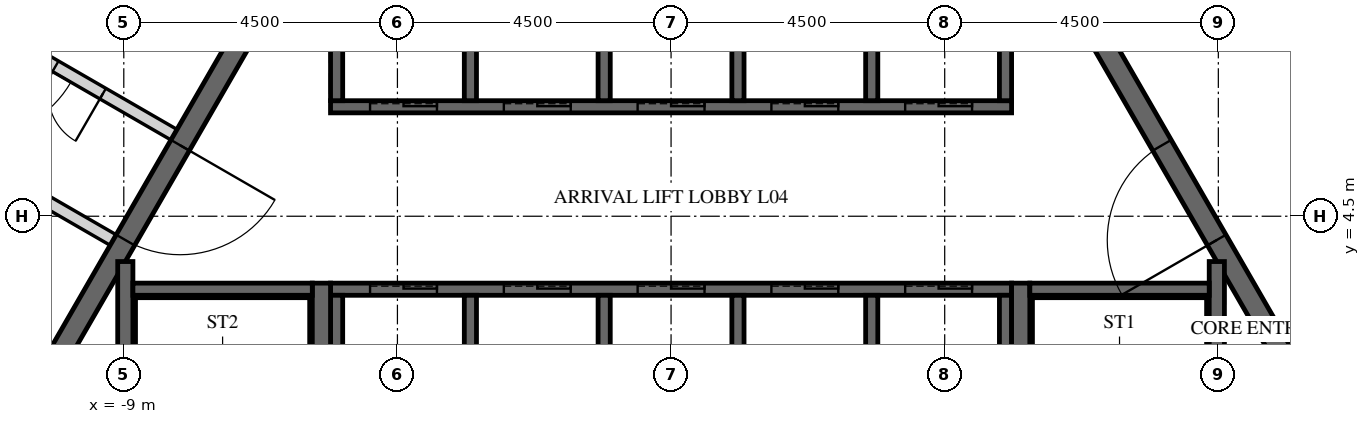
"""IFC4 building model, lengths in metres.
Left out: names, types, materials, properties, quantities, classifications, styles, units other than length and angle.
Written with IfcOpenShell. Run it as: python <this file> out.ifc"""

import sys

from ifc_helpers import new_model, si_unit, direction, frame, frame_2d, origin, place, context, subcontext, project, spatial, polyline, rectangle, outline, extrude, element, fill, save


model = new_model("IFC4")
c1 = context("Model", 3, precision=1e-05, world=origin(), true_north=direction((0.0, 1.0)))
c2 = subcontext(c1, "Body", "Model", "MODEL_VIEW")
j1 = project(units=[si_unit("LENGTHUNIT", "METRE"), si_unit("PLANEANGLEUNIT", "RADIAN")], contexts=[c1])
p1 = place(None, origin())
s1 = spatial("IfcSite", under=j1, at=p1, CompositionType="ELEMENT")
p2 = place(p1, origin())
s2 = spatial("IfcBuilding", under=s1, at=p2, CompositionType="ELEMENT")
p3 = place(p2, frame((0.0, 0.0, 26.0)))
s3 = spatial("IfcBuildingStorey", under=s2, at=p3, CompositionType="ELEMENT", Elevation=26.0)
p4 = place(p3, frame((-7.91, 13.7, -0.25), z_axis=(0.0, 0.0, 1.0), x_axis=(-0.499999880136, -0.866025472988, 0.0)))
e1 = element("IfcWall", 1, at=p4, inside=s3, PredefinedType="SHEAR", context=c2, shape_type="SweptSolid", body=[
    extrude(outline(polyline([(-0.173, -0.3), (15.993, -0.3), (15.646, 0.3), (0.173, 0.3), (-0.173, -0.3)])), origin(), (0.0, 0.0, 1.0), 5.45),
])
p5 = place(p4, frame((7.039, 0.0, 0.25)))
e2 = element("IfcOpeningElement", 2, at=p5, cuts=e1, PredefinedType="OPENING", context=c2, shape_type="SweptSolid", body=[
    extrude(rectangle(XDim=1.8, YDim=2.4, at=frame_2d((0.9, 1.2))), frame((0.0, 0.31, 0.0), z_axis=(0.0, -1.0, 0.0), x_axis=(1.0, 0.0, 0.0)), (0.0, 0.0, 1.0), 0.62),
])
p6 = place(p3, frame((15.819, 0.0, -0.25), z_axis=(0.0, 0.0, 1.0), x_axis=(-0.499999880136, 0.866025472988, 0.0)))
e3 = element("IfcWall", 3, at=p6, inside=s3, PredefinedType="SHEAR", context=c2, shape_type="SweptSolid", body=[
    extrude(outline(polyline([(-0.173, -0.3), (15.993, -0.3), (15.646, 0.3), (0.173, 0.3), (-0.173, -0.3)])), origin(), (0.0, 0.0, 1.0), 5.45),
])
p7 = place(p6, frame((6.981, 0.0, 0.25)))
e4 = element("IfcOpeningElement", 4, at=p7, cuts=e3, PredefinedType="OPENING", context=c2, shape_type="SweptSolid", body=[
    extrude(rectangle(XDim=1.8, YDim=2.4, at=frame_2d((0.9, 1.2))), frame((0.0, 0.31, 0.0), z_axis=(0.0, -1.0, 0.0), x_axis=(1.0, 0.0, 0.0)), (0.0, 0.0, 1.0), 0.62),
])
p8 = place(p3, frame((-5.673, 9.825, -0.25), z_axis=(0.0, 0.0, 1.0), x_axis=(-0.499995046907, -0.866028263435, 0.0)))
e5 = element("IfcWall", 5, at=p8, inside=s3, PredefinedType="SHEAR", context=c2, shape_type="SweptSolid", body=[
    extrude(outline(polyline([(-0.101, -0.175), (11.446, -0.175), (11.244, 0.175), (0.101, 0.175), (-0.101, -0.175)])), origin(), (0.0, 0.0, 1.0), 5.45),
])
p9 = place(p8, frame((4.801, 0.0, 0.25)))
e6 = element("IfcOpeningElement", 6, at=p9, cuts=e5, PredefinedType="OPENING", context=c2, shape_type="SweptSolid", body=[
    extrude(rectangle(XDim=1.8, YDim=2.4, at=frame_2d((0.9, 1.2))), frame((0.0, 0.185, 0.0), z_axis=(0.0, -1.0, 0.0), x_axis=(1.0, 0.0, 0.0)), (0.0, 0.0, 1.0), 0.37),
])
p10 = place(p3, frame((11.345, 0.0, -0.25), z_axis=(0.0, 0.0, 1.0), x_axis=(-0.499995046907, 0.866028263435, 0.0)))
e7 = element("IfcWall", 7, at=p10, inside=s3, PredefinedType="SHEAR", context=c2, shape_type="SweptSolid", body=[
    extrude(outline(polyline([(-0.101, -0.175), (11.446, -0.175), (11.244, 0.175), (0.101, 0.175), (-0.101, -0.175)])), origin(), (0.0, 0.0, 1.0), 5.45),
])
p11 = place(p10, frame((4.744, 0.0, 0.25)))
e8 = element("IfcOpeningElement", 8, at=p11, cuts=e7, PredefinedType="OPENING", context=c2, shape_type="SweptSolid", body=[
    extrude(rectangle(XDim=1.8, YDim=2.4, at=frame_2d((0.9, 1.2))), frame((0.0, 0.185, 0.0), z_axis=(0.0, -1.0, 0.0), x_axis=(1.0, 0.0, 0.0)), (0.0, 0.0, 1.0), 0.37),
])
p12 = place(p3, frame((-5.6, 6.3, -0.25), z_axis=(0.0, 0.0, 1.0), x_axis=(1.0, 0.0, 0.0)))
e9 = element("IfcWall", 9, at=p12, inside=s3, PredefinedType="SHEAR", context=c2, shape_type="SweptSolid", body=[
    extrude(rectangle(XDim=11.2, YDim=0.2, at=frame_2d((5.6, 0.0))), origin(), (0.0, 0.0, 1.0), 5.5),
])
p13 = place(p12, frame((0.65, 0.0, 0.25)))
e10 = element("IfcOpeningElement", 10, at=p13, cuts=e9, PredefinedType="OPENING", context=c2, shape_type="SweptSolid", body=[
    extrude(rectangle(XDim=1.1, YDim=2.1, at=frame_2d((0.55, 1.05))), frame((0.0, 0.11, 0.0), z_axis=(0.0, -1.0, 0.0), x_axis=(1.0, 0.0, 0.0)), (0.0, 0.0, 1.0), 0.22),
])
p14 = place(p12, frame((2.85, 0.0, 0.25)))
e11 = element("IfcOpeningElement", 11, at=p14, cuts=e9, PredefinedType="OPENING", context=c2, shape_type="SweptSolid", body=[
    extrude(rectangle(XDim=1.1, YDim=2.1, at=frame_2d((0.55, 1.05))), frame((0.0, 0.11, 0.0), z_axis=(0.0, -1.0, 0.0), x_axis=(1.0, 0.0, 0.0)), (0.0, 0.0, 1.0), 0.22),
])
p15 = place(p12, frame((5.05, 0.0, 0.25)))
e12 = element("IfcOpeningElement", 12, at=p15, cuts=e9, PredefinedType="OPENING", context=c2, shape_type="SweptSolid", body=[
    extrude(rectangle(XDim=1.1, YDim=2.1, at=frame_2d((0.55, 1.05))), frame((0.0, 0.11, 0.0), z_axis=(0.0, -1.0, 0.0), x_axis=(1.0, 0.0, 0.0)), (0.0, 0.0, 1.0), 0.22),
])
p16 = place(p12, frame((7.25, 0.0, 0.25)))
e13 = element("IfcOpeningElement", 13, at=p16, cuts=e9, PredefinedType="OPENING", context=c2, shape_type="SweptSolid", body=[
    extrude(rectangle(XDim=1.1, YDim=2.1, at=frame_2d((0.55, 1.05))), frame((0.0, 0.11, 0.0), z_axis=(0.0, -1.0, 0.0), x_axis=(1.0, 0.0, 0.0)), (0.0, 0.0, 1.0), 0.22),
])
p17 = place(p12, frame((9.45, 0.0, 0.25)))
e14 = element("IfcOpeningElement", 14, at=p17, cuts=e9, PredefinedType="OPENING", context=c2, shape_type="SweptSolid", body=[
    extrude(rectangle(XDim=1.1, YDim=2.1, at=frame_2d((0.55, 1.05))), frame((0.0, 0.11, 0.0), z_axis=(0.0, -1.0, 0.0), x_axis=(1.0, 0.0, 0.0)), (0.0, 0.0, 1.0), 0.22),
])
for number, where, z_axis, x_axis in (
    (15, (-5.5, 6.4, -0.25), (0.0, 0.0, 1.0), (0.0, 1.0, 0.0)),
    (16, (-3.3, 6.4, -0.25), (0.0, 0.0, 1.0), (0.0, 1.0, 0.0)),
    (17, (-1.1, 6.4, -0.25), (0.0, 0.0, 1.0), (0.0, 1.0, 0.0)),
    (18, (1.1, 6.4, -0.25), (0.0, 0.0, 1.0), (0.0, 1.0, 0.0)),
    (19, (3.3, 6.4, -0.25), (0.0, 0.0, 1.0), (0.0, 1.0, 0.0)),
    (20, (5.5, 6.4, -0.25), (0.0, 0.0, 1.0), (0.0, 1.0, 0.0)),
):
    element("IfcWall", number, at=place(p3, frame(where, z_axis=z_axis, x_axis=x_axis)), inside=s3, PredefinedType="SHEAR", context=c2, shape_type="SweptSolid", body=[
        extrude(rectangle(XDim=2.9, YDim=0.2, at=frame_2d((1.45, 0.0))), origin(), (0.0, 0.0, 1.0), 5.5),
    ])
p18 = place(p3, frame((-5.6, 3.3, -0.25), z_axis=(0.0, 0.0, 1.0), x_axis=(1.0, 0.0, 0.0)))
e21 = element("IfcWall", 21, at=p18, inside=s3, PredefinedType="SHEAR", context=c2, shape_type="SweptSolid", body=[
    extrude(rectangle(XDim=11.2, YDim=0.2, at=frame_2d((5.6, 0.0))), origin(), (0.0, 0.0, 1.0), 5.5),
])
p19 = place(p18, frame((0.65, 0.0, 0.25)))
e22 = element("IfcOpeningElement", 22, at=p19, cuts=e21, PredefinedType="OPENING", context=c2, shape_type="SweptSolid", body=[
    extrude(rectangle(XDim=1.1, YDim=2.1, at=frame_2d((0.55, 1.05))), frame((0.0, 0.11, 0.0), z_axis=(0.0, -1.0, 0.0), x_axis=(1.0, 0.0, 0.0)), (0.0, 0.0, 1.0), 0.22),
])
p20 = place(p18, frame((2.85, 0.0, 0.25)))
e23 = element("IfcOpeningElement", 23, at=p20, cuts=e21, PredefinedType="OPENING", context=c2, shape_type="SweptSolid", body=[
    extrude(rectangle(XDim=1.1, YDim=2.1, at=frame_2d((0.55, 1.05))), frame((0.0, 0.11, 0.0), z_axis=(0.0, -1.0, 0.0), x_axis=(1.0, 0.0, 0.0)), (0.0, 0.0, 1.0), 0.22),
])
p21 = place(p18, frame((5.05, 0.0, 0.25)))
e24 = element("IfcOpeningElement", 24, at=p21, cuts=e21, PredefinedType="OPENING", context=c2, shape_type="SweptSolid", body=[
    extrude(rectangle(XDim=1.1, YDim=2.1, at=frame_2d((0.55, 1.05))), frame((0.0, 0.11, 0.0), z_axis=(0.0, -1.0, 0.0), x_axis=(1.0, 0.0, 0.0)), (0.0, 0.0, 1.0), 0.22),
])
p22 = place(p18, frame((7.25, 0.0, 0.25)))
e25 = element("IfcOpeningElement", 25, at=p22, cuts=e21, PredefinedType="OPENING", context=c2, shape_type="SweptSolid", body=[
    extrude(rectangle(XDim=1.1, YDim=2.1, at=frame_2d((0.55, 1.05))), frame((0.0, 0.11, 0.0), z_axis=(0.0, -1.0, 0.0), x_axis=(1.0, 0.0, 0.0)), (0.0, 0.0, 1.0), 0.22),
])
p23 = place(p18, frame((9.45, 0.0, 0.25)))
e26 = element("IfcOpeningElement", 26, at=p23, cuts=e21, PredefinedType="OPENING", context=c2, shape_type="SweptSolid", body=[
    extrude(rectangle(XDim=1.1, YDim=2.1, at=frame_2d((0.55, 1.05))), frame((0.0, 0.11, 0.0), z_axis=(0.0, -1.0, 0.0), x_axis=(1.0, 0.0, 0.0)), (0.0, 0.0, 1.0), 0.22),
])
for number, where, z_axis, x_axis in (
    (27, (-5.5, 0.1, -0.25), (0.0, 0.0, 1.0), (0.0, 1.0, 0.0)),
    (28, (-3.3, 0.1, -0.25), (0.0, 0.0, 1.0), (0.0, 1.0, 0.0)),
    (29, (-1.1, 0.1, -0.25), (0.0, 0.0, 1.0), (0.0, 1.0, 0.0)),
    (30, (1.1, 0.1, -0.25), (0.0, 0.0, 1.0), (0.0, 1.0, 0.0)),
    (31, (3.3, 0.1, -0.25), (0.0, 0.0, 1.0), (0.0, 1.0, 0.0)),
    (32, (5.5, 0.1, -0.25), (0.0, 0.0, 1.0), (0.0, 1.0, 0.0)),
):
    element("IfcWall", number, at=place(p3, frame(where, z_axis=z_axis, x_axis=x_axis)), inside=s3, PredefinedType="SHEAR", context=c2, shape_type="SweptSolid", body=[
        extrude(rectangle(XDim=3.1, YDim=0.2, at=frame_2d((1.55, 0.0))), origin(), (0.0, 0.0, 1.0), 5.5),
    ])
p24 = place(p3, frame((-9.175, 4.109, 0.0), z_axis=(0.0, 0.0, 1.0), x_axis=(-0.865989465428, 0.500062241894, 0.0)))
e33 = element("IfcWall", 33, at=p24, inside=s3, PredefinedType="PARTITIONING", context=c2, shape_type="SweptSolid", body=[
    extrude(rectangle(XDim=3.4, YDim=0.2, at=frame_2d((1.7, 0.0))), origin(), (0.0, 0.0, 1.0), 5.25),
])
p25 = place(p24, frame((1.351, 0.0, 0.0)))
e34 = element("IfcOpeningElement", 34, at=p25, cuts=e33, PredefinedType="OPENING", context=c2, shape_type="SweptSolid", body=[
    extrude(rectangle(XDim=0.9, YDim=2.1, at=frame_2d((0.45, 1.05))), frame((0.0, 0.11, 0.0), z_axis=(0.0, -1.0, 0.0), x_axis=(1.0, 0.0, 0.0)), (0.0, 0.0, 1.0), 0.22),
])
p26 = place(p3, frame((-8.175, 5.841, 0.0), z_axis=(0.0, 0.0, 1.0), x_axis=(-0.866020560687, 0.500008388397, 0.0)))
e35 = element("IfcWall", 35, at=p26, inside=s3, PredefinedType="PARTITIONING", context=c2, shape_type="SweptSolid", body=[
    extrude(rectangle(XDim=3.4, YDim=0.2, at=frame_2d((1.7, 0.0))), origin(), (0.0, 0.0, 1.0), 5.25),
])
p27 = place(p26, frame((1.35, 0.0, 0.0)))
e36 = element("IfcOpeningElement", 36, at=p27, cuts=e35, PredefinedType="OPENING", context=c2, shape_type="SweptSolid", body=[
    extrude(rectangle(XDim=0.9, YDim=2.1, at=frame_2d((0.45, 1.05))), frame((0.0, 0.11, 0.0), z_axis=(0.0, -1.0, 0.0), x_axis=(1.0, 0.0, 0.0)), (0.0, 0.0, 1.0), 0.22),
])
p28 = place(p3, frame((5.75, -3.4, -0.25), z_axis=(0.0, 0.0, 1.0), x_axis=(0.0, 1.0, 0.0)))
e37 = element("IfcWall", 37, at=p28, inside=s3, PredefinedType="SHEAR", context=c2, shape_type="SweptSolid", body=[
    extrude(rectangle(XDim=6.8, YDim=0.3, at=frame_2d((3.4, 0.0))), origin(), (0.0, 0.0, 1.0), 5.5),
])
p29 = place(p3, frame((8.975, -3.755, -0.25), z_axis=(0.0, 0.0, 1.0), x_axis=(0.0, 1.0, 0.0)))
e38 = element("IfcWall", 38, at=p29, inside=s3, PredefinedType="SHEAR", context=c2, shape_type="SweptSolid", body=[
    extrude(rectangle(XDim=7.51, YDim=0.25, at=frame_2d((3.755, 0.0))), origin(), (0.0, 0.0, 1.0), 5.5),
])
p30 = place(p3, frame((5.9, 3.3, -0.25), z_axis=(0.0, 0.0, 1.0), x_axis=(1.0, 0.0, 0.0)))
e39 = element("IfcWall", 39, at=p30, inside=s3, PredefinedType="SHEAR", context=c2, shape_type="SweptSolid", body=[
    extrude(rectangle(XDim=2.95, YDim=0.2, at=frame_2d((1.475, 0.0))), origin(), (0.0, 0.0, 1.0), 5.5),
])
p31 = place(p3, frame((-5.75, -3.4, -0.25), z_axis=(0.0, 0.0, 1.0), x_axis=(0.0, 1.0, 0.0)))
e40 = element("IfcWall", 40, at=p31, inside=s3, PredefinedType="SHEAR", context=c2, shape_type="SweptSolid", body=[
    extrude(rectangle(XDim=6.8, YDim=0.3, at=frame_2d((3.4, 0.0))), origin(), (0.0, 0.0, 1.0), 5.5),
])
p32 = place(p3, frame((-8.975, -3.755, -0.25), z_axis=(0.0, 0.0, 1.0), x_axis=(0.0, 1.0, 0.0)))
e41 = element("IfcWall", 41, at=p32, inside=s3, PredefinedType="SHEAR", context=c2, shape_type="SweptSolid", body=[
    extrude(rectangle(XDim=7.51, YDim=0.25, at=frame_2d((3.755, 0.0))), origin(), (0.0, 0.0, 1.0), 5.5),
])
p33 = place(p3, frame((-8.85, 3.3, -0.25), z_axis=(0.0, 0.0, 1.0), x_axis=(1.0, 0.0, 0.0)))
e42 = element("IfcWall", 42, at=p33, inside=s3, PredefinedType="SHEAR", context=c2, shape_type="SweptSolid", body=[
    extrude(rectangle(XDim=2.95, YDim=0.2, at=frame_2d((1.475, 0.0))), origin(), (0.0, 0.0, 1.0), 5.5),
])
p34 = place(p9, origin())
e43 = element("IfcDoor", 43, at=p34, inside=s3, OperationType="DOUBLE_DOOR_SINGLE_SWING", PredefinedType="DOOR", context=c2, shape_type="SweptSolid", body=[
    extrude(rectangle(XDim=1.8, YDim=2.4, at=frame_2d((0.9, 1.2))), frame((0.0, 0.025, 0.0), z_axis=(0.0, -1.0, 0.0), x_axis=(1.0, 0.0, 0.0)), (0.0, 0.0, 1.0), 0.05),
])
fill(e6, e43)
p35 = place(p11, origin())
e44 = element("IfcDoor", 44, at=p35, inside=s3, OperationType="DOUBLE_DOOR_SINGLE_SWING", PredefinedType="DOOR", context=c2, shape_type="SweptSolid", body=[
    extrude(rectangle(XDim=1.8, YDim=2.4, at=frame_2d((0.9, 1.2))), frame((0.0, 0.025, 0.0), z_axis=(0.0, -1.0, 0.0), x_axis=(1.0, 0.0, 0.0)), (0.0, 0.0, 1.0), 0.05),
])
fill(e8, e44)
p36 = place(p27, origin())
e45 = element("IfcDoor", 45, at=p36, inside=s3, OperationType="SINGLE_SWING_LEFT", PredefinedType="DOOR", context=c2, shape_type="SweptSolid", body=[
    extrude(rectangle(XDim=0.9, YDim=2.1, at=frame_2d((0.45, 1.05))), frame((0.0, 0.025, 0.0), z_axis=(0.0, -1.0, 0.0), x_axis=(1.0, 0.0, 0.0)), (0.0, 0.0, 1.0), 0.05),
])
fill(e36, e45)
p37 = place(p13, origin())
e46 = element("IfcDoor", 46, at=p37, inside=s3, OperationType="SLIDING_TO_LEFT", PredefinedType="DOOR", context=c2, shape_type="SweptSolid", body=[
    extrude(rectangle(XDim=1.1, YDim=2.1, at=frame_2d((0.55, 1.05))), frame((0.0, 0.025, 0.0), z_axis=(0.0, -1.0, 0.0), x_axis=(1.0, 0.0, 0.0)), (0.0, 0.0, 1.0), 0.05),
])
fill(e10, e46)
p38 = place(p14, origin())
e47 = element("IfcDoor", 47, at=p38, inside=s3, OperationType="SLIDING_TO_LEFT", PredefinedType="DOOR", context=c2, shape_type="SweptSolid", body=[
    extrude(rectangle(XDim=1.1, YDim=2.1, at=frame_2d((0.55, 1.05))), frame((0.0, 0.025, 0.0), z_axis=(0.0, -1.0, 0.0), x_axis=(1.0, 0.0, 0.0)), (0.0, 0.0, 1.0), 0.05),
])
fill(e11, e47)
p39 = place(p15, origin())
e48 = element("IfcDoor", 48, at=p39, inside=s3, OperationType="SLIDING_TO_LEFT", PredefinedType="DOOR", context=c2, shape_type="SweptSolid", body=[
    extrude(rectangle(XDim=1.1, YDim=2.1, at=frame_2d((0.55, 1.05))), frame((0.0, 0.025, 0.0), z_axis=(0.0, -1.0, 0.0), x_axis=(1.0, 0.0, 0.0)), (0.0, 0.0, 1.0), 0.05),
])
fill(e12, e48)
p40 = place(p16, origin())
e49 = element("IfcDoor", 49, at=p40, inside=s3, OperationType="SLIDING_TO_LEFT", PredefinedType="DOOR", context=c2, shape_type="SweptSolid", body=[
    extrude(rectangle(XDim=1.1, YDim=2.1, at=frame_2d((0.55, 1.05))), frame((0.0, 0.025, 0.0), z_axis=(0.0, -1.0, 0.0), x_axis=(1.0, 0.0, 0.0)), (0.0, 0.0, 1.0), 0.05),
])
fill(e13, e49)
p41 = place(p17, origin())
e50 = element("IfcDoor", 50, at=p41, inside=s3, OperationType="SLIDING_TO_LEFT", PredefinedType="DOOR", context=c2, shape_type="SweptSolid", body=[
    extrude(rectangle(XDim=1.1, YDim=2.1, at=frame_2d((0.55, 1.05))), frame((0.0, 0.025, 0.0), z_axis=(0.0, -1.0, 0.0), x_axis=(1.0, 0.0, 0.0)), (0.0, 0.0, 1.0), 0.05),
])
fill(e14, e50)
p42 = place(p19, origin())
e51 = element("IfcDoor", 51, at=p42, inside=s3, OperationType="SLIDING_TO_LEFT", PredefinedType="DOOR", context=c2, shape_type="SweptSolid", body=[
    extrude(rectangle(XDim=1.1, YDim=2.1, at=frame_2d((0.55, 1.05))), frame((0.0, 0.025, 0.0), z_axis=(0.0, -1.0, 0.0), x_axis=(1.0, 0.0, 0.0)), (0.0, 0.0, 1.0), 0.05),
])
fill(e22, e51)
p43 = place(p20, origin())
e52 = element("IfcDoor", 52, at=p43, inside=s3, OperationType="SLIDING_TO_LEFT", PredefinedType="DOOR", context=c2, shape_type="SweptSolid", body=[
    extrude(rectangle(XDim=1.1, YDim=2.1, at=frame_2d((0.55, 1.05))), frame((0.0, 0.025, 0.0), z_axis=(0.0, -1.0, 0.0), x_axis=(1.0, 0.0, 0.0)), (0.0, 0.0, 1.0), 0.05),
])
fill(e23, e52)
p44 = place(p21, origin())
e53 = element("IfcDoor", 53, at=p44, inside=s3, OperationType="SLIDING_TO_LEFT", PredefinedType="DOOR", context=c2, shape_type="SweptSolid", body=[
    extrude(rectangle(XDim=1.1, YDim=2.1, at=frame_2d((0.55, 1.05))), frame((0.0, 0.025, 0.0), z_axis=(0.0, -1.0, 0.0), x_axis=(1.0, 0.0, 0.0)), (0.0, 0.0, 1.0), 0.05),
])
fill(e24, e53)
p45 = place(p22, origin())
e54 = element("IfcDoor", 54, at=p45, inside=s3, OperationType="SLIDING_TO_LEFT", PredefinedType="DOOR", context=c2, shape_type="SweptSolid", body=[
    extrude(rectangle(XDim=1.1, YDim=2.1, at=frame_2d((0.55, 1.05))), frame((0.0, 0.025, 0.0), z_axis=(0.0, -1.0, 0.0), x_axis=(1.0, 0.0, 0.0)), (0.0, 0.0, 1.0), 0.05),
])
fill(e25, e54)
p46 = place(p23, origin())
e55 = element("IfcDoor", 55, at=p46, inside=s3, OperationType="SLIDING_TO_LEFT", PredefinedType="DOOR", context=c2, shape_type="SweptSolid", body=[
    extrude(rectangle(XDim=1.1, YDim=2.1, at=frame_2d((0.55, 1.05))), frame((0.0, 0.025, 0.0), z_axis=(0.0, -1.0, 0.0), x_axis=(1.0, 0.0, 0.0)), (0.0, 0.0, 1.0), 0.05),
])
fill(e26, e55)
save(model, sys.argv[1])
